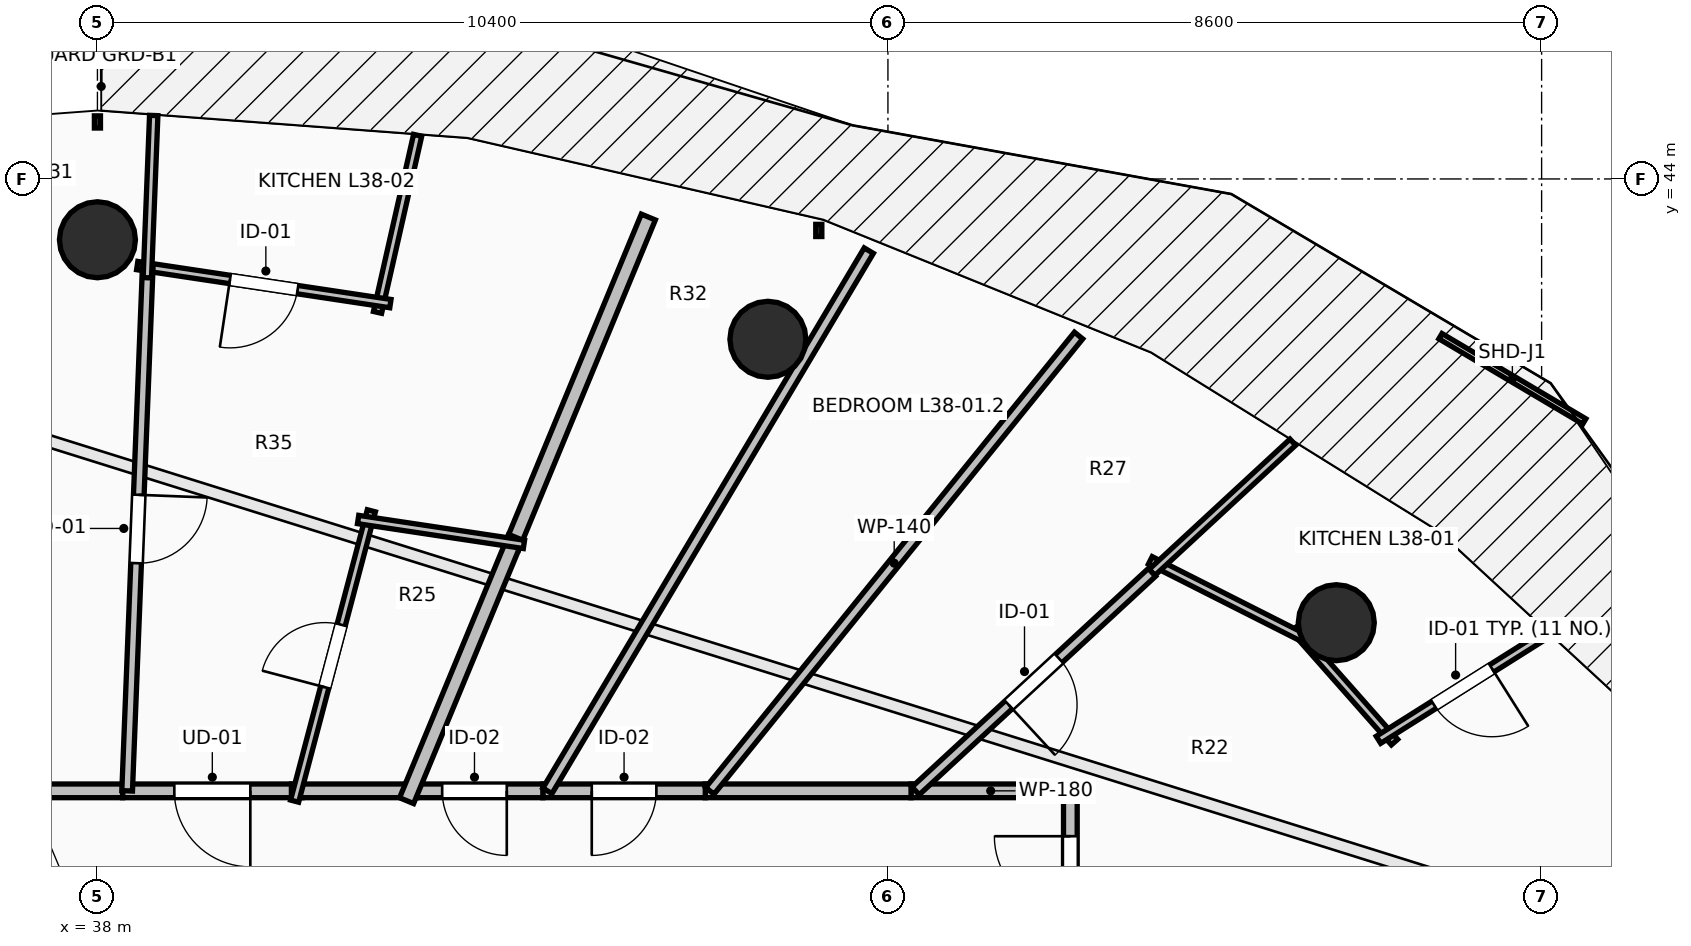
"""IFC4 building model, lengths in metres.
Left out: names, types, materials, properties, quantities, classifications, styles, units other than length and angle.
Written with IfcOpenShell. Run it as: python <this file> out.ifc"""

import sys

from ifc_helpers import new_model, si_unit, direction, frame, frame_2d, origin, origin_2d, place, context, subcontext, project, spatial, rectangle, circle, extrude, element, fill, save


model = new_model("IFC4")
c1 = context("Model", 3, precision=1e-05, world=origin(), true_north=direction((0.0, 1.0)))
c2 = subcontext(c1, "Body", "Model", "MODEL_VIEW")
j1 = project(units=[si_unit("LENGTHUNIT", "METRE"), si_unit("PLANEANGLEUNIT", "RADIAN")], contexts=[c1])
p1 = place(None, origin())
s1 = spatial("IfcSite", under=j1, at=p1, CompositionType="ELEMENT")
p2 = place(p1, origin())
s2 = spatial("IfcBuilding", under=s1, at=p2, CompositionType="ELEMENT")
p3 = place(p2, frame((0.0, 0.0, 143.1)))
s3 = spatial("IfcBuildingStorey", under=s2, at=p3, CompositionType="ELEMENT", Elevation=143.1)
for number, where, z_axis, x_axis in (
    (1, (54.299, 38.162, 0.0), (0.0, 0.0, 1.0), (0.707, 0.707, 0.0)),
    (2, (46.821, 41.891, 0.0), (0.0, 0.0, 1.0), (0.383, 0.924, 0.0)),
    (3, (38.0, 43.2, 0.0), (0.0, 0.0, 1.0), (0.0, 1.0, 0.0)),
):
    element("IfcColumn", number, at=place(p3, frame(where, z_axis=z_axis, x_axis=x_axis)), inside=s3, PredefinedType="COLUMN", context=c2, shape_type="SweptSolid", body=[
        extrude(circle(Radius=0.5, at=origin_2d()), origin(), (0.0, 0.0, 1.0), 3.5),
    ])
p4 = place(p3, frame((50.8, 33.756, 0.0), z_axis=(0.0, 0.0, 1.0), x_axis=(0.0, 1.0, 0.0)))
e4 = element("IfcWall", 4, at=p4, inside=s3, PredefinedType="PARTITIONING", context=c2, shape_type="SweptSolid", body=[
    extrude(rectangle(XDim=2.194, YDim=0.18, at=frame_2d((1.097, 0.0))), origin(), (0.0, 0.0, 1.0), 2.432),
])
p5 = place(p4, frame((0.597, 0.0, 0.0)))
e5 = element("IfcOpeningElement", 5, at=p5, cuts=e4, PredefinedType="OPENING", context=c2, shape_type="SweptSolid", body=[
    extrude(rectangle(XDim=1.0, YDim=2.15, at=frame_2d((0.5, 1.075))), frame((0.0, 0.105, 0.0), z_axis=(0.0, -1.0, 0.0), x_axis=(1.0, 0.0, 0.0)), (0.0, 0.0, 1.0), 0.21),
])
p6 = place(p3, frame((50.8, 35.95, 0.0), z_axis=(0.0, 0.0, 1.0), x_axis=(-1.0, 0.0, 0.0)))
e6 = element("IfcWall", 6, at=p6, inside=s3, PredefinedType="PARTITIONING", context=c2, shape_type="SweptSolid", body=[
    extrude(rectangle(XDim=2.096, YDim=0.18, at=frame_2d((1.048, 0.0))), origin(), (0.0, 0.0, 1.0), 2.972),
])
p7 = place(p3, frame((48.704, 35.95, 0.0), z_axis=(0.0, 0.0, 1.0), x_axis=(-1.0, 0.0, 0.0)))
e7 = element("IfcWall", 7, at=p7, inside=s3, PredefinedType="PARTITIONING", context=c2, shape_type="SweptSolid", body=[
    extrude(rectangle(XDim=2.707, YDim=0.18, at=frame_2d((1.354, 0.0))), origin(), (0.0, 0.0, 1.0), 2.432),
])
p8 = place(p3, frame((45.997, 35.95, 0.0), z_axis=(0.0, 0.0, 1.0), x_axis=(-1.0, 0.0, 0.0)))
e8 = element("IfcWall", 8, at=p8, inside=s3, PredefinedType="PARTITIONING", context=c2, shape_type="SweptSolid", body=[
    extrude(rectangle(XDim=2.137, YDim=0.18, at=frame_2d((1.068, 0.0))), origin(), (0.0, 0.0, 1.0), 2.972),
])
p9 = place(p8, frame((0.644, 0.0, 0.0)))
e9 = element("IfcOpeningElement", 9, at=p9, cuts=e8, PredefinedType="OPENING", context=c2, shape_type="SweptSolid", body=[
    extrude(rectangle(XDim=0.85, YDim=2.1, at=frame_2d((0.425, 1.05))), frame((0.0, 0.105, 0.0), z_axis=(0.0, -1.0, 0.0), x_axis=(1.0, 0.0, 0.0)), (0.0, 0.0, 1.0), 0.21),
])
p10 = place(p3, frame((43.86, 35.95, 0.0), z_axis=(0.0, 0.0, 1.0), x_axis=(-1.0, 0.0, 0.0)))
e10 = element("IfcWall", 10, at=p10, inside=s3, PredefinedType="PARTITIONING", context=c2, shape_type="SweptSolid", body=[
    extrude(rectangle(XDim=1.799, YDim=0.18, at=frame_2d((0.899, 0.0))), origin(), (0.0, 0.0, 1.0), 3.24),
])
p11 = place(p10, frame((0.475, 0.0, 0.0)))
e11 = element("IfcOpeningElement", 11, at=p11, cuts=e10, PredefinedType="OPENING", context=c2, shape_type="SweptSolid", body=[
    extrude(rectangle(XDim=0.85, YDim=2.1, at=frame_2d((0.425, 1.05))), frame((0.0, 0.105, 0.0), z_axis=(0.0, -1.0, 0.0), x_axis=(1.0, 0.0, 0.0)), (0.0, 0.0, 1.0), 0.21),
])
p12 = place(p3, frame((40.692, 35.95, 0.0), z_axis=(0.0, 0.0, 1.0), x_axis=(-1.0, 0.0, 0.0)))
e12 = element("IfcWall", 12, at=p12, inside=s3, PredefinedType="PARTITIONING", context=c2, shape_type="SweptSolid", body=[
    extrude(rectangle(XDim=2.361, YDim=0.18, at=frame_2d((1.18, 0.0))), origin(), (0.0, 0.0, 1.0), 3.24),
])
p13 = place(p12, frame((0.68, 0.0, 0.0)))
e13 = element("IfcOpeningElement", 13, at=p13, cuts=e12, PredefinedType="OPENING", context=c2, shape_type="SweptSolid", body=[
    extrude(rectangle(XDim=1.0, YDim=2.15, at=frame_2d((0.5, 1.075))), frame((0.0, 0.105, 0.0), z_axis=(0.0, -1.0, 0.0), x_axis=(1.0, 0.0, 0.0)), (0.0, 0.0, 1.0), 0.21),
])
p14 = place(p3, frame((42.201, 35.95, 0.0), z_axis=(0.0, 0.0, 1.0), x_axis=(-1.0, 0.0, 0.0)))
e14 = element("IfcWall", 14, at=p14, inside=s3, PredefinedType="PARTITIONING", context=c2, shape_type="SweptSolid", body=[
    extrude(rectangle(XDim=1.649, YDim=0.18, at=frame_2d((0.824, 0.0))), origin(), (0.0, 0.0, 1.0), 3.24),
])
p15 = place(p3, frame((38.331, 35.95, 0.0), z_axis=(0.0, 0.0, 1.0), x_axis=(-1.0, 0.0, 0.0)))
e15 = element("IfcWall", 15, at=p15, inside=s3, PredefinedType="PARTITIONING", context=c2, shape_type="SweptSolid", body=[
    extrude(rectangle(XDim=1.437, YDim=0.18, at=frame_2d((0.719, 0.0))), origin(), (0.0, 0.0, 1.0), 3.24),
])
p16 = place(p3, frame((55.065, 36.591, 0.0), z_axis=(0.0, 0.0, 1.0), x_axis=(-0.66216897397, 0.749354555542, 0.0)))
e16 = element("IfcWall", 16, at=p16, inside=s3, PredefinedType="PARTITIONING", context=c2, shape_type="SweptSolid", body=[
    extrude(rectangle(XDim=1.991, YDim=0.11, at=frame_2d((0.996, 0.0))), origin(), (0.0, 0.0, 1.0), 2.432),
])
p17 = place(p3, frame((53.964, 37.915, 0.0), z_axis=(0.0, 0.0, 1.0), x_axis=(-0.89250004606, 0.451047301049, 0.0)))
e17 = element("IfcWall", 17, at=p17, inside=s3, PredefinedType="PARTITIONING", context=c2, shape_type="SweptSolid", body=[
    extrude(rectangle(XDim=2.366, YDim=0.11, at=frame_2d((1.183, 0.0))), origin(), (0.0, 0.0, 1.0), 2.432),
])
p18 = place(p3, frame((51.874, 38.824, 0.0), z_axis=(0.0, 0.0, 1.0), x_axis=(0.734191073284, 0.678942904749, 0.0)))
e18 = element("IfcWall", 18, at=p18, inside=s3, PredefinedType="PARTITIONING", context=c2, shape_type="SweptSolid", body=[
    extrude(rectangle(XDim=2.523, YDim=0.11, at=frame_2d((1.262, 0.0))), origin(), (0.0, 0.0, 1.0), 2.728),
])
p19 = place(p3, frame((57.075, 38.021, 0.0), z_axis=(0.0, 0.0, 1.0), x_axis=(-0.846034075758, -0.533128823697, 0.0)))
e19 = element("IfcWall", 19, at=p19, inside=s3, PredefinedType="PARTITIONING", context=c2, shape_type="SweptSolid", body=[
    extrude(rectangle(XDim=2.626, YDim=0.11, at=frame_2d((1.313, 0.0))), origin(), (0.0, 0.0, 1.0), 2.728),
])
p20 = place(p19, frame((0.863, 0.0, 0.0)))
e20 = element("IfcOpeningElement", 20, at=p20, cuts=e19, PredefinedType="OPENING", context=c2, shape_type="SweptSolid", body=[
    extrude(rectangle(XDim=0.9, YDim=2.1, at=frame_2d((0.45, 1.05))), frame((0.0, 0.07, 0.0), z_axis=(0.0, -1.0, 0.0), x_axis=(1.0, 0.0, 0.0)), (0.0, 0.0, 1.0), 0.14),
])
p21 = place(p3, frame((51.874, 38.824, 0.0), z_axis=(0.0, 0.0, 1.0), x_axis=(-0.734347971597, -0.678773199685, 0.0)))
e21 = element("IfcWall", 21, at=p21, inside=s3, PredefinedType="PARTITIONING", context=c2, shape_type="SweptSolid", body=[
    extrude(rectangle(XDim=4.235, YDim=0.14, at=frame_2d((2.117, 0.0))), origin(), (0.0, 0.0, 1.0), 2.922),
])
p22 = place(p21, frame((1.667, 0.0, 0.0)))
e22 = element("IfcOpeningElement", 22, at=p22, cuts=e21, PredefinedType="OPENING", context=c2, shape_type="SweptSolid", body=[
    extrude(rectangle(XDim=0.9, YDim=2.1, at=frame_2d((0.45, 1.05))), frame((0.0, 0.085, 0.0), z_axis=(0.0, -1.0, 0.0), x_axis=(1.0, 0.0, 0.0)), (0.0, 0.0, 1.0), 0.17),
])
p23 = place(p3, frame((54.156, 32.692, 0.0), z_axis=(0.0, 0.0, 1.0), x_axis=(0.923849528339, 0.382755860814, 0.0)))
e23 = element("IfcWall", 23, at=p23, inside=s3, PredefinedType="PARTITIONING", context=c2, shape_type="SweptSolid", body=[
    extrude(rectangle(XDim=5.941, YDim=0.2, at=frame_2d((2.97, 0.0))), origin(), (0.0, 0.0, 1.0), 2.432),
])
p24 = place(p3, frame((50.908, 41.94, 0.0), z_axis=(0.0, 0.0, 1.0), x_axis=(-0.62935766896, -0.77711577292, 0.0)))
e24 = element("IfcWall", 24, at=p24, inside=s3, PredefinedType="PARTITIONING", context=c2, shape_type="SweptSolid", body=[
    extrude(rectangle(XDim=7.708, YDim=0.14, at=frame_2d((3.854, 0.0))), origin(), (0.0, 0.0, 1.0), 2.432),
])
p25 = place(p3, frame((48.148, 43.057, 0.0), z_axis=(0.0, 0.0, 1.0), x_axis=(-0.511279346901, -0.859414585304, 0.0)))
e25 = element("IfcWall", 25, at=p25, inside=s3, PredefinedType="PARTITIONING", context=c2, shape_type="SweptSolid", body=[
    extrude(rectangle(XDim=8.27, YDim=0.14, at=frame_2d((4.135, 0.0))), origin(), (0.0, 0.0, 1.0), 2.432),
])
p26 = place(p3, frame((45.248, 43.499, 0.0), z_axis=(0.0, 0.0, 1.0), x_axis=(-0.382708032219, -0.923869342535, 0.0)))
e26 = element("IfcWall", 26, at=p26, inside=s3, PredefinedType="PARTITIONING", context=c2, shape_type="SweptSolid", body=[
    extrude(rectangle(XDim=4.701, YDim=0.2, at=frame_2d((2.351, 0.0))), origin(), (0.0, 0.0, 1.0), 2.728),
])
p27 = place(p3, frame((43.503, 39.285, 0.0), z_axis=(0.0, 0.0, 1.0), x_axis=(-0.382733183699, -0.923858923265, 0.0)))
e27 = element("IfcWall", 27, at=p27, inside=s3, PredefinedType="PARTITIONING", context=c2, shape_type="SweptSolid", body=[
    extrude(rectangle(XDim=3.75, YDim=0.2, at=frame_2d((1.875, 0.0))), origin(), (0.0, 0.0, 1.0), 2.922),
])
p28 = place(p3, frame((40.594, 35.815, 0.0), z_axis=(0.0, 0.0, 1.0), x_axis=(0.255512094359, 0.966805859331, 0.0)))
e28 = element("IfcWall", 28, at=p28, inside=s3, PredefinedType="PARTITIONING", context=c2, shape_type="SweptSolid", body=[
    extrude(rectangle(XDim=3.951, YDim=0.11, at=frame_2d((1.976, 0.0))), origin(), (0.0, 0.0, 1.0), 2.922),
])
p29 = place(p28, frame((1.551, 0.0, 0.0)))
e29 = element("IfcOpeningElement", 29, at=p29, cuts=e28, PredefinedType="OPENING", context=c2, shape_type="SweptSolid", body=[
    extrude(rectangle(XDim=0.85, YDim=2.1, at=frame_2d((0.425, 1.05))), frame((0.0, 0.07, 0.0), z_axis=(0.0, -1.0, 0.0), x_axis=(1.0, 0.0, 0.0)), (0.0, 0.0, 1.0), 0.14),
])
p30 = place(p3, frame((41.43, 39.52, 0.0), z_axis=(0.0, 0.0, 1.0), x_axis=(0.98891036234, -0.148513619769, 0.0)))
e30 = element("IfcWall", 30, at=p30, inside=s3, PredefinedType="PARTITIONING", context=c2, shape_type="SweptSolid", body=[
    extrude(rectangle(XDim=2.206, YDim=0.11, at=frame_2d((1.103, 0.0))), origin(), (0.0, 0.0, 1.0), 2.922),
])
p31 = place(p3, frame((42.213, 44.574, 0.0), z_axis=(0.0, 0.0, 1.0), x_axis=(-0.220932027223, -0.975289208054, 0.0)))
e31 = element("IfcWall", 31, at=p31, inside=s3, PredefinedType="PARTITIONING", context=c2, shape_type="SweptSolid", body=[
    extrude(rectangle(XDim=2.389, YDim=0.11, at=frame_2d((1.195, 0.0))), origin(), (0.0, 0.0, 1.0), 2.728),
])
p32 = place(p3, frame((41.854, 42.36, 0.0), z_axis=(0.0, 0.0, 1.0), x_axis=(-0.988887919082, 0.148662986296, 0.0)))
e32 = element("IfcWall", 32, at=p32, inside=s3, PredefinedType="PARTITIONING", context=c2, shape_type="SweptSolid", body=[
    extrude(rectangle(XDim=3.368, YDim=0.11, at=frame_2d((1.684, 0.0))), origin(), (0.0, 0.0, 1.0), 3.24),
])
p33 = place(p32, frame((1.234, 0.0, 0.0)))
e33 = element("IfcOpeningElement", 33, at=p33, cuts=e32, PredefinedType="OPENING", context=c2, shape_type="SweptSolid", body=[
    extrude(rectangle(XDim=0.9, YDim=2.1, at=frame_2d((0.45, 1.05))), frame((0.0, 0.07, 0.0), z_axis=(0.0, -1.0, 0.0), x_axis=(1.0, 0.0, 0.0)), (0.0, 0.0, 1.0), 0.14),
])
p34 = place(p3, frame((38.662, 42.84, 0.0), z_axis=(0.0, 0.0, 1.0), x_axis=(-0.039300632457, -0.999227431713, 0.0)))
e34 = element("IfcWall", 34, at=p34, inside=s3, PredefinedType="PARTITIONING", context=c2, shape_type="SweptSolid", body=[
    extrude(rectangle(XDim=6.896, YDim=0.14, at=frame_2d((3.448, 0.0))), origin(), (0.0, 0.0, 1.0), 2.922),
])
p35 = place(p34, frame((2.998, 0.0, 0.0)))
e35 = element("IfcOpeningElement", 35, at=p35, cuts=e34, PredefinedType="OPENING", context=c2, shape_type="SweptSolid", body=[
    extrude(rectangle(XDim=0.9, YDim=2.1, at=frame_2d((0.45, 1.05))), frame((0.0, 0.085, 0.0), z_axis=(0.0, -1.0, 0.0), x_axis=(1.0, 0.0, 0.0)), (0.0, 0.0, 1.0), 0.17),
])
p36 = place(p3, frame((38.74, 44.835, 0.0), z_axis=(0.0, 0.0, 1.0), x_axis=(-0.039310852952, -0.999227029679, 0.0)))
e36 = element("IfcWall", 36, at=p36, inside=s3, PredefinedType="PARTITIONING", context=c2, shape_type="SweptSolid", body=[
    extrude(rectangle(XDim=2.136, YDim=0.11, at=frame_2d((1.068, 0.0))), origin(), (0.0, 0.0, 1.0), 2.728),
])
p37 = place(p5, origin())
e37 = element("IfcDoor", 37, at=p37, inside=s3, OperationType="SINGLE_SWING_RIGHT", PredefinedType="DOOR", context=c2, shape_type="SweptSolid", body=[
    extrude(rectangle(XDim=1.0, YDim=2.15, at=frame_2d((0.5, 1.075))), frame((0.0, 0.025, 0.0), z_axis=(0.0, -1.0, 0.0), x_axis=(1.0, 0.0, 0.0)), (0.0, 0.0, 1.0), 0.05),
])
fill(e5, e37)
p38 = place(p13, origin())
e38 = element("IfcDoor", 38, at=p38, inside=s3, OperationType="SINGLE_SWING_LEFT", PredefinedType="DOOR", context=c2, shape_type="SweptSolid", body=[
    extrude(rectangle(XDim=1.0, YDim=2.15, at=frame_2d((0.5, 1.075))), frame((0.0, 0.025, 0.0), z_axis=(0.0, -1.0, 0.0), x_axis=(1.0, 0.0, 0.0)), (0.0, 0.0, 1.0), 0.05),
])
fill(e13, e38)
p39 = place(p20, origin())
e39 = element("IfcDoor", 39, at=p39, inside=s3, OperationType="SINGLE_SWING_LEFT", PredefinedType="DOOR", context=c2, shape_type="SweptSolid", body=[
    extrude(rectangle(XDim=0.9, YDim=2.1, at=frame_2d((0.45, 1.05))), frame((0.0, 0.025, 0.0), z_axis=(0.0, -1.0, 0.0), x_axis=(1.0, 0.0, 0.0)), (0.0, 0.0, 1.0), 0.05),
])
fill(e20, e39)
p40 = place(p22, origin())
e40 = element("IfcDoor", 40, at=p40, inside=s3, OperationType="SINGLE_SWING_RIGHT", PredefinedType="DOOR", context=c2, shape_type="SweptSolid", body=[
    extrude(rectangle(XDim=0.9, YDim=2.1, at=frame_2d((0.45, 1.05))), frame((0.0, 0.025, 0.0), z_axis=(0.0, -1.0, 0.0), x_axis=(1.0, 0.0, 0.0)), (0.0, 0.0, 1.0), 0.05),
])
fill(e22, e40)
p41 = place(p29, origin())
e41 = element("IfcDoor", 41, at=p41, inside=s3, OperationType="SINGLE_SWING_LEFT", PredefinedType="DOOR", context=c2, shape_type="SweptSolid", body=[
    extrude(rectangle(XDim=0.85, YDim=2.1, at=frame_2d((0.425, 1.05))), frame((0.0, 0.025, 0.0), z_axis=(0.0, -1.0, 0.0), x_axis=(1.0, 0.0, 0.0)), (0.0, 0.0, 1.0), 0.05),
])
fill(e29, e41)
p42 = place(p33, origin())
e42 = element("IfcDoor", 42, at=p42, inside=s3, OperationType="SINGLE_SWING_RIGHT", PredefinedType="DOOR", context=c2, shape_type="SweptSolid", body=[
    extrude(rectangle(XDim=0.9, YDim=2.1, at=frame_2d((0.45, 1.05))), frame((0.0, 0.025, 0.0), z_axis=(0.0, -1.0, 0.0), x_axis=(1.0, 0.0, 0.0)), (0.0, 0.0, 1.0), 0.05),
])
fill(e33, e42)
p43 = place(p35, origin())
e43 = element("IfcDoor", 43, at=p43, inside=s3, OperationType="SINGLE_SWING_LEFT", PredefinedType="DOOR", context=c2, shape_type="SweptSolid", body=[
    extrude(rectangle(XDim=0.9, YDim=2.1, at=frame_2d((0.45, 1.05))), frame((0.0, 0.025, 0.0), z_axis=(0.0, -1.0, 0.0), x_axis=(1.0, 0.0, 0.0)), (0.0, 0.0, 1.0), 0.05),
])
fill(e35, e43)
p44 = place(p9, origin())
e44 = element("IfcDoor", 44, at=p44, inside=s3, OperationType="SINGLE_SWING_RIGHT", PredefinedType="DOOR", context=c2, shape_type="SweptSolid", body=[
    extrude(rectangle(XDim=0.85, YDim=2.1, at=frame_2d((0.425, 1.05))), frame((0.0, 0.025, 0.0), z_axis=(0.0, -1.0, 0.0), x_axis=(1.0, 0.0, 0.0)), (0.0, 0.0, 1.0), 0.05),
])
fill(e9, e44)
p45 = place(p11, origin())
e45 = element("IfcDoor", 45, at=p45, inside=s3, OperationType="SINGLE_SWING_LEFT", PredefinedType="DOOR", context=c2, shape_type="SweptSolid", body=[
    extrude(rectangle(XDim=0.85, YDim=2.1, at=frame_2d((0.425, 1.05))), frame((0.0, 0.025, 0.0), z_axis=(0.0, -1.0, 0.0), x_axis=(1.0, 0.0, 0.0)), (0.0, 0.0, 1.0), 0.05),
])
fill(e11, e45)
save(model, sys.argv[1])
